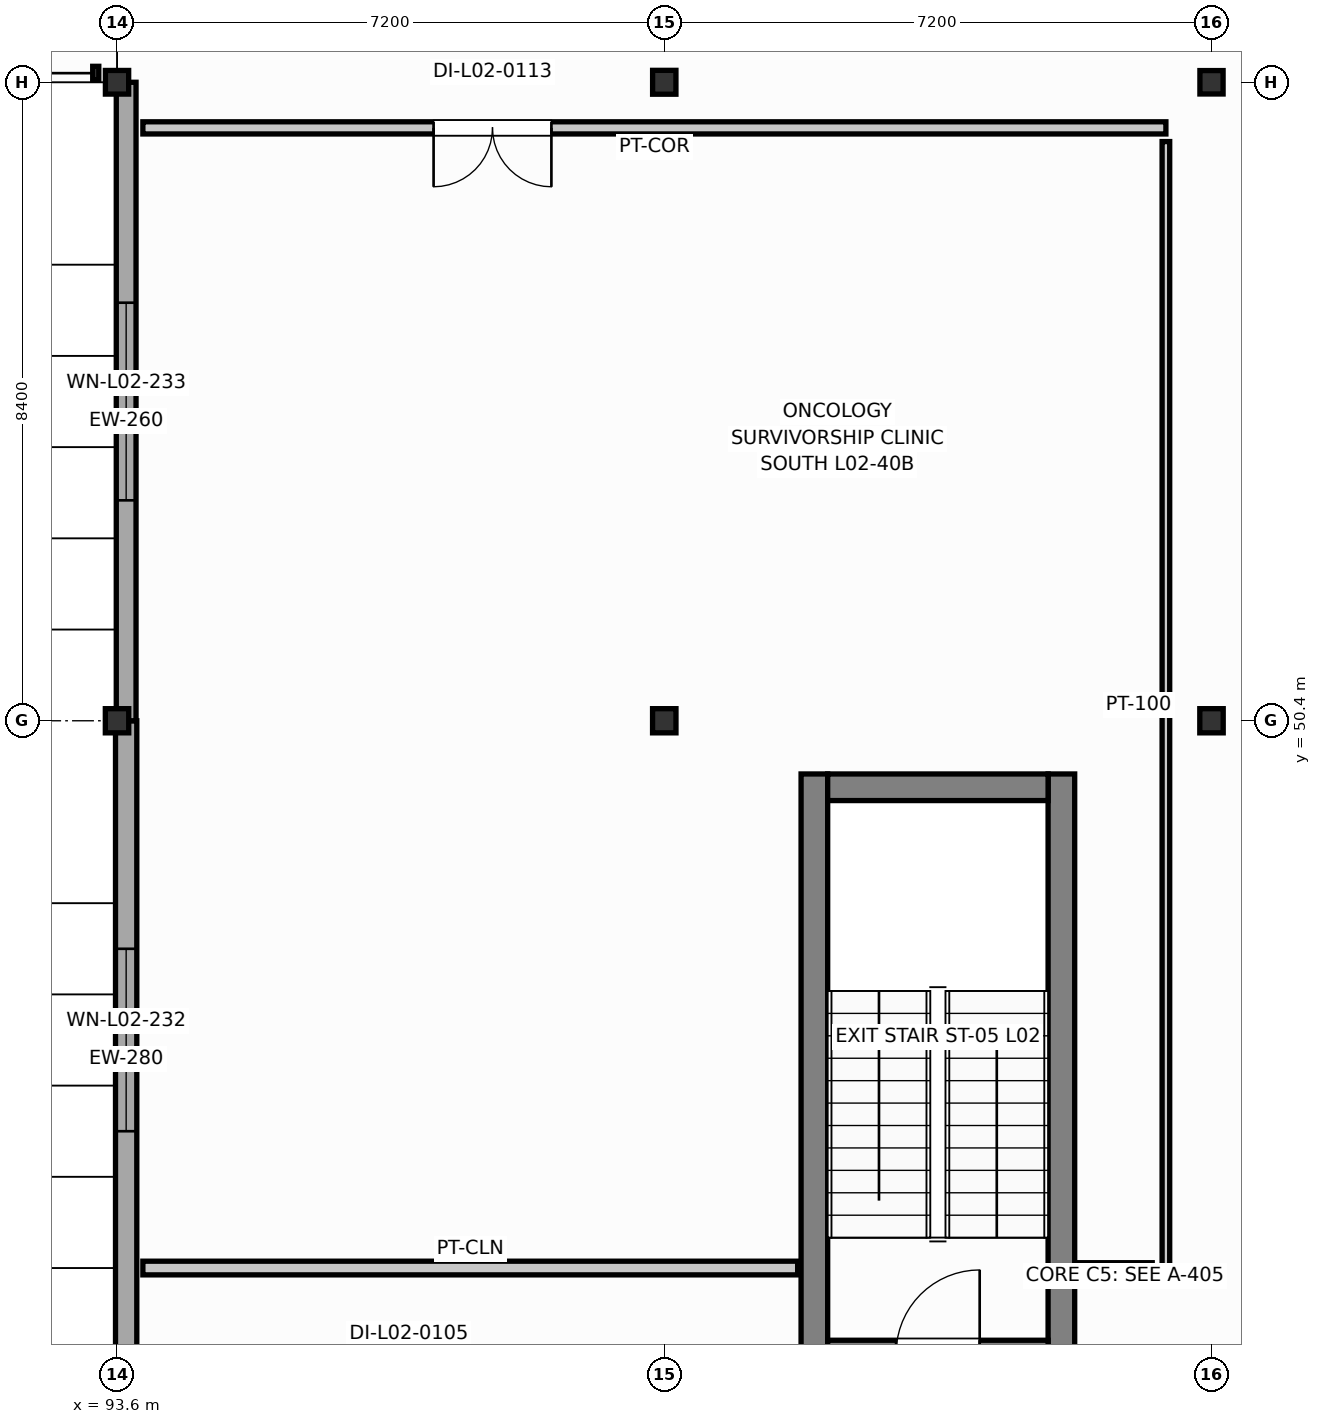
"""IFC4 building model, lengths in metres.
Left out: names, types, materials, properties, quantities, classifications, styles, units other than length and angle.
Written with IfcOpenShell. Run it as: python <this file> out.ifc"""

import sys

from ifc_helpers import new_model, si_unit, direction, frame, frame_2d, origin, origin_2d, place, context, subcontext, project, spatial, rectangle, i_section, extrude, element, fill, save


model = new_model("IFC4")
c1 = context("Model", 3, precision=1e-05, world=origin(), true_north=direction((0.0, 1.0)))
c2 = subcontext(c1, "Body", "Model", "MODEL_VIEW")
j1 = project(units=[si_unit("LENGTHUNIT", "METRE"), si_unit("PLANEANGLEUNIT", "RADIAN")], contexts=[c1])
p1 = place(None, origin())
s1 = spatial("IfcSite", under=j1, at=p1, CompositionType="ELEMENT")
p2 = place(p1, origin())
s2 = spatial("IfcBuilding", under=s1, at=p2, CompositionType="ELEMENT")
p3 = place(p2, frame((0.0, 0.0, 9.0)))
s3 = spatial("IfcBuildingStorey", under=s2, at=p3, CompositionType="ELEMENT", Elevation=9.0)
p4 = place(p3, frame((93.6, 50.4, 0.0), z_axis=(0.0, 0.0, 1.0), x_axis=(1.0, 0.0, 0.0)))
e1 = element("IfcColumn", 1, at=p4, inside=s3, PredefinedType="COLUMN", context=c2, shape_type="SweptSolid", body=[
    extrude(i_section(OverallWidth=0.308, OverallDepth=0.318, WebThickness=0.013, FlangeThickness=0.021, FilletRadius=0.016, at=origin_2d()), origin(), (0.0, 0.0, 1.0), 4.2),
])
p5 = place(p3, frame((93.6, 58.8, 0.0), z_axis=(0.0, 0.0, 1.0), x_axis=(1.0, 0.0, 0.0)))
e2 = element("IfcColumn", 2, at=p5, inside=s3, PredefinedType="COLUMN", context=c2, shape_type="SweptSolid", body=[
    extrude(i_section(OverallWidth=0.306, OverallDepth=0.311, WebThickness=0.011, FlangeThickness=0.017, FilletRadius=0.015, at=origin_2d()), origin(), (0.0, 0.0, 1.0), 4.2),
])
p6 = place(p3, frame((100.8, 50.4, 0.0), z_axis=(0.0, 0.0, 1.0), x_axis=(1.0, 0.0, 0.0)))
e3 = element("IfcColumn", 3, at=p6, inside=s3, PredefinedType="COLUMN", context=c2, shape_type="SweptSolid", body=[
    extrude(i_section(OverallWidth=0.308, OverallDepth=0.318, WebThickness=0.013, FlangeThickness=0.021, FilletRadius=0.016, at=origin_2d()), origin(), (0.0, 0.0, 1.0), 4.2),
])
p7 = place(p3, frame((100.8, 58.8, 0.0), z_axis=(0.0, 0.0, 1.0), x_axis=(1.0, 0.0, 0.0)))
e4 = element("IfcColumn", 4, at=p7, inside=s3, PredefinedType="COLUMN", context=c2, shape_type="SweptSolid", body=[
    extrude(i_section(OverallWidth=0.307, OverallDepth=0.314, WebThickness=0.012, FlangeThickness=0.019, FilletRadius=0.016, at=origin_2d()), origin(), (0.0, 0.0, 1.0), 4.2),
])
p8 = place(p3, frame((108.0, 50.4, 0.0), z_axis=(0.0, 0.0, 1.0), x_axis=(1.0, 0.0, 0.0)))
e5 = element("IfcColumn", 5, at=p8, inside=s3, PredefinedType="COLUMN", context=c2, shape_type="SweptSolid", body=[
    extrude(i_section(OverallWidth=0.308, OverallDepth=0.318, WebThickness=0.013, FlangeThickness=0.021, FilletRadius=0.016, at=origin_2d()), origin(), (0.0, 0.0, 1.0), 4.2),
])
p9 = place(p3, frame((108.0, 58.8, 0.0), z_axis=(0.0, 0.0, 1.0), x_axis=(1.0, 0.0, 0.0)))
e6 = element("IfcColumn", 6, at=p9, inside=s3, PredefinedType="COLUMN", context=c2, shape_type="SweptSolid", body=[
    extrude(i_section(OverallWidth=0.305, OverallDepth=0.308, WebThickness=0.01, FlangeThickness=0.015, FilletRadius=0.015, at=origin_2d()), origin(), (0.0, 0.0, 1.0), 4.2),
])
for number, where, z_axis, x_axis in (
    (7, (102.775, 41.9, 0.0), (0.0, 0.0, 1.0), (0.0, 1.0, 0.0)),
    (8, (106.025, 41.9, 0.0), (0.0, 0.0, 1.0), (0.0, 1.0, 0.0)),
):
    element("IfcWall", number, at=place(p3, frame(where, z_axis=z_axis, x_axis=x_axis)), inside=s3, PredefinedType="SHEAR", context=c2, shape_type="SweptSolid", body=[
        extrude(rectangle(XDim=7.8, YDim=0.35, at=frame_2d((3.9, 0.0))), origin(), (0.0, 0.0, 1.0), 3.99),
    ])
p10 = place(p3, frame((102.95, 49.525, 0.0), z_axis=(0.0, 0.0, 1.0), x_axis=(1.0, 0.0, 0.0)))
e9 = element("IfcWall", 9, at=p10, inside=s3, PredefinedType="SHEAR", context=c2, shape_type="SweptSolid", body=[
    extrude(rectangle(XDim=2.9, YDim=0.35, at=frame_2d((1.45, 0.0))), origin(), (0.0, 0.0, 1.0), 3.99),
])
p11 = place(p3, frame((102.95, 42.075, 0.0), z_axis=(0.0, 0.0, 1.0), x_axis=(1.0, 0.0, 0.0)))
e10 = element("IfcWall", 10, at=p11, inside=s3, PredefinedType="SHEAR", context=c2, shape_type="SweptSolid", body=[
    extrude(rectangle(XDim=2.9, YDim=0.35, at=frame_2d((1.45, 0.0))), origin(), (0.0, 0.0, 1.0), 3.99),
])
p12 = place(p11, frame((0.9, 0.0, 0.0)))
e11 = element("IfcOpeningElement", 11, at=p12, cuts=e10, PredefinedType="OPENING", context=c2, shape_type="SweptSolid", body=[
    extrude(rectangle(XDim=1.1, YDim=2.15, at=frame_2d((0.55, 1.075))), frame((0.0, 0.185, 0.0), z_axis=(0.0, -1.0, 0.0), x_axis=(1.0, 0.0, 0.0)), (0.0, 0.0, 1.0), 0.37),
])
p13 = place(p3, frame((93.72, 42.0, 0.0), z_axis=(0.0, 0.0, 1.0), x_axis=(0.0, 1.0, 0.0)))
e12 = element("IfcWall", 12, at=p13, inside=s3, PredefinedType="SOLIDWALL", context=c2, shape_type="SweptSolid", body=[
    extrude(rectangle(XDim=8.4, YDim=0.28, at=frame_2d((4.2, 0.0))), origin(), (0.0, 0.0, 1.0), 3.482),
])
p14 = place(p13, frame((3.0, 0.0, 0.95)))
e13 = element("IfcOpeningElement", 13, at=p14, cuts=e12, PredefinedType="OPENING", context=c2, shape_type="SweptSolid", body=[
    extrude(rectangle(XDim=2.4, YDim=1.75, at=frame_2d((1.2, 0.875))), frame((0.0, 0.15, 0.0), z_axis=(0.0, -1.0, 0.0), x_axis=(1.0, 0.0, 0.0)), (0.0, 0.0, 1.0), 0.3),
])
p15 = place(p3, frame((93.72, 50.4, 0.0), z_axis=(0.0, 0.0, 1.0), x_axis=(0.0, 1.0, 0.0)))
e14 = element("IfcWall", 14, at=p15, inside=s3, PredefinedType="SOLIDWALL", context=c2, shape_type="SweptSolid", body=[
    extrude(rectangle(XDim=8.4, YDim=0.26, at=frame_2d((4.2, 0.0))), origin(), (0.0, 0.0, 1.0), 3.091),
])
p16 = place(p15, frame((2.9, 0.0, 0.95)))
e15 = element("IfcOpeningElement", 15, at=p16, cuts=e14, PredefinedType="OPENING", context=c2, shape_type="SweptSolid", body=[
    extrude(rectangle(XDim=2.6, YDim=1.15, at=frame_2d((1.3, 0.575))), frame((0.0, 0.14, 0.0), z_axis=(0.0, -1.0, 0.0), x_axis=(1.0, 0.0, 0.0)), (0.0, 0.0, 1.0), 0.28),
])
p17 = place(p3, frame((102.555, 43.2, 0.0), z_axis=(0.0, 0.0, 1.0), x_axis=(-1.0, 0.0, 0.0)))
e16 = element("IfcWall", 16, at=p17, inside=s3, PredefinedType="PARTITIONING", context=c2, shape_type="SweptSolid", body=[
    extrude(rectangle(XDim=8.615, YDim=0.18, at=frame_2d((4.308, 0.0))), origin(), (0.0, 0.0, 1.0), 3.485),
])
p18 = place(p3, frame((93.94, 58.2, 0.0), z_axis=(0.0, 0.0, 1.0), x_axis=(1.0, 0.0, 0.0)))
e17 = element("IfcWall", 17, at=p18, inside=s3, PredefinedType="PARTITIONING", context=c2, shape_type="SweptSolid", body=[
    extrude(rectangle(XDim=13.46, YDim=0.16, at=frame_2d((6.73, 0.0))), origin(), (0.0, 0.0, 1.0), 3.532),
])
p19 = place(p18, frame((3.825, 0.0, 0.0)))
e18 = element("IfcOpeningElement", 18, at=p19, cuts=e17, PredefinedType="OPENING", context=c2, shape_type="SweptSolid", body=[
    extrude(rectangle(XDim=1.55, YDim=2.2, at=frame_2d((0.775, 1.1))), frame((0.0, 0.09, 0.0), z_axis=(0.0, -1.0, 0.0), x_axis=(1.0, 0.0, 0.0)), (0.0, 0.0, 1.0), 0.18),
])
p20 = place(p3, frame((107.4, 58.02, 0.0), z_axis=(0.0, 0.0, 1.0), x_axis=(0.0, -1.0, 0.0)))
e19 = element("IfcWall", 19, at=p20, inside=s3, PredefinedType="PARTITIONING", context=c2, shape_type="SweptSolid", body=[
    extrude(rectangle(XDim=14.82, YDim=0.1, at=frame_2d((7.41, 0.0))), origin(), (0.0, 0.0, 1.0), 3.479),
])
p21 = place(p3, frame((107.22, 43.2, 0.0), z_axis=(0.0, 0.0, 1.0), x_axis=(-1.0, 0.0, 0.0)))
e20 = element("IfcWall", 20, at=p21, inside=s3, PredefinedType="PARTITIONING", context=c2, shape_type="SweptSolid", body=[
    extrude(rectangle(XDim=0.975, YDim=0.14, at=frame_2d((0.487, 0.0))), origin(), (0.0, 0.0, 1.0), 3.945),
])
p22 = place(p14, origin())
e21 = element("IfcWindow", 21, at=p22, inside=s3, PartitioningType="SINGLE_PANEL", PredefinedType="WINDOW", context=c2, shape_type="SweptSolid", body=[
    extrude(rectangle(XDim=2.4, YDim=1.75, at=frame_2d((1.2, 0.875))), frame((0.0, 0.03, 0.0), z_axis=(0.0, -1.0, 0.0), x_axis=(1.0, 0.0, 0.0)), (0.0, 0.0, 1.0), 0.06),
])
fill(e13, e21)
p23 = place(p16, origin())
e22 = element("IfcWindow", 22, at=p23, inside=s3, PartitioningType="SINGLE_PANEL", PredefinedType="WINDOW", context=c2, shape_type="SweptSolid", body=[
    extrude(rectangle(XDim=2.6, YDim=1.15, at=frame_2d((1.3, 0.575))), frame((0.0, 0.03, 0.0), z_axis=(0.0, -1.0, 0.0), x_axis=(1.0, 0.0, 0.0)), (0.0, 0.0, 1.0), 0.06),
])
fill(e15, e22)
p24 = place(p19, frame((1.55, 0.0, 0.0), z_axis=(0.0, 0.0, 1.0), x_axis=(-1.0, 0.0, 0.0)))
e23 = element("IfcDoor", 23, at=p24, inside=s3, OperationType="DOUBLE_DOOR_SINGLE_SWING", PredefinedType="DOOR", context=c2, shape_type="SweptSolid", body=[
    extrude(rectangle(XDim=1.55, YDim=2.2, at=frame_2d((0.775, 1.1))), frame((0.0, 0.025, 0.0), z_axis=(0.0, -1.0, 0.0), x_axis=(1.0, 0.0, 0.0)), (0.0, 0.0, 1.0), 0.05),
])
fill(e18, e23)
save(model, sys.argv[1])
